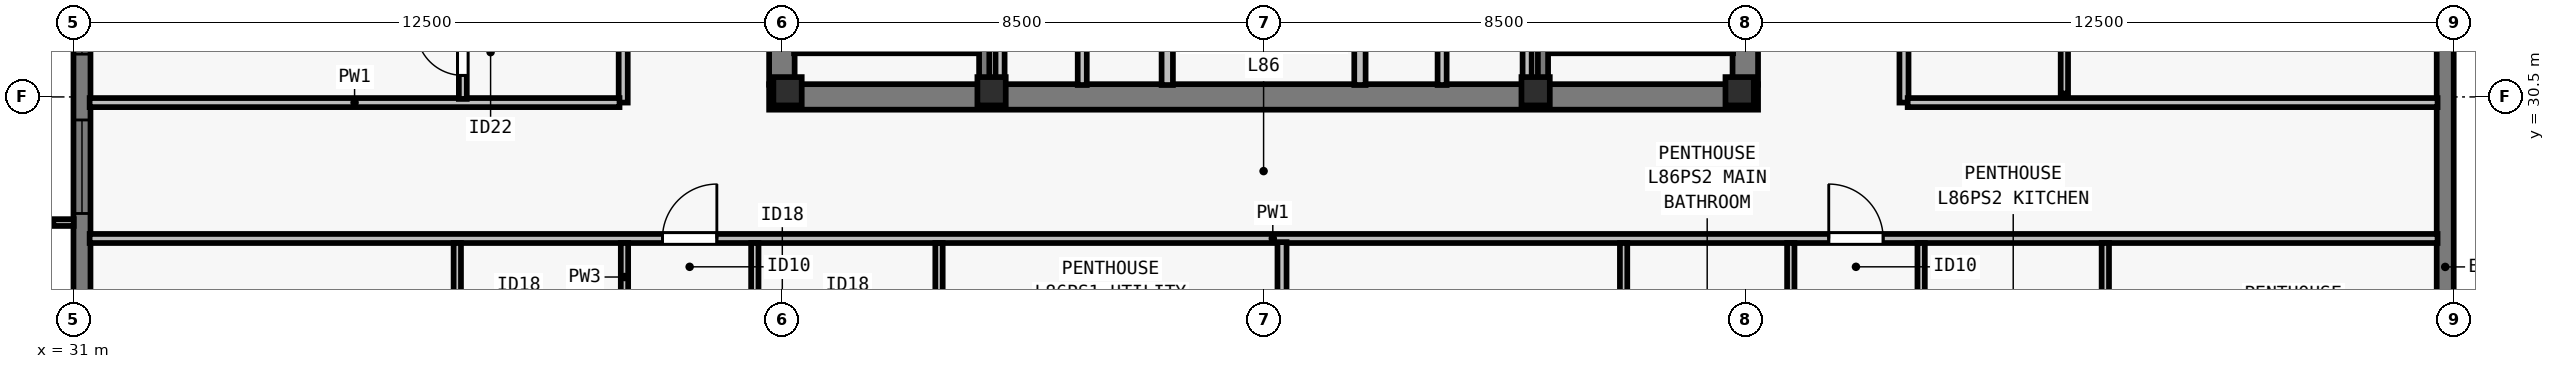
"""IFC4 building model, lengths in metres.
Left out: names, types, materials, properties, quantities, classifications, styles, units other than length and angle.
Written with IfcOpenShell. Run it as: python <this file> out.ifc"""

import sys

from ifc_helpers import new_model, si_unit, direction, frame, frame_2d, origin, origin_2d, place, context, subcontext, project, spatial, rectangle, i_section, extrude, element, fill, save


model = new_model("IFC4")
c1 = context("Model", 3, precision=1e-05, world=origin(), true_north=direction((0.0, 1.0)))
c2 = subcontext(c1, "Body", "Model", "MODEL_VIEW")
j1 = project(units=[si_unit("LENGTHUNIT", "METRE"), si_unit("PLANEANGLEUNIT", "RADIAN")], contexts=[c1])
p1 = place(None, origin())
s1 = spatial("IfcSite", under=j1, at=p1, CompositionType="ELEMENT")
p2 = place(p1, origin())
s2 = spatial("IfcBuilding", under=s1, at=p2, CompositionType="ELEMENT")
p3 = place(p2, frame((0.0, 0.0, 312.0)))
s3 = spatial("IfcBuildingStorey", under=s2, at=p3, CompositionType="ELEMENT", Elevation=312.0)
for number, where, z_axis, x_axis in (
    (1, (43.6, 30.6, 0.0), (0.0, 0.0, 1.0), (1.0, 0.0, 0.0)),
    (2, (47.2, 30.6, 0.0), (0.0, 0.0, 1.0), (1.0, 0.0, 0.0)),
    (3, (56.8, 30.6, 0.0), (0.0, 0.0, 1.0), (1.0, 0.0, 0.0)),
    (4, (60.4, 30.6, 0.0), (0.0, 0.0, 1.0), (1.0, 0.0, 0.0)),
):
    element("IfcColumn", number, at=place(p3, frame(where, z_axis=z_axis, x_axis=x_axis)), inside=s3, PredefinedType="COLUMN", context=c2, shape_type="SweptSolid", body=[
        extrude(i_section(OverallWidth=0.5, OverallDepth=0.5, WebThickness=0.028, FlangeThickness=0.045, at=origin_2d()), origin(), (0.0, 0.0, 1.0), 3.5),
    ])
p4 = place(p3, frame((72.85, 44.4, 0.0), z_axis=(0.0, 0.0, 1.0), x_axis=(0.0, -1.0, 0.0)))
e5 = element("IfcWall", 5, at=p4, inside=s3, PredefinedType="SOLIDWALL", context=c2, shape_type="SweptSolid", body=[
    extrude(rectangle(XDim=20.622, YDim=0.3, at=frame_2d((10.311, 0.0))), origin(), (0.0, 0.0, 1.0), 3.29),
])
p5 = place(p4, frame((2.815, 0.0, 0.8)))
e6 = element("IfcOpeningElement", 6, at=p5, cuts=e5, PredefinedType="OPENING", context=c2, shape_type="SweptSolid", body=[
    extrude(rectangle(XDim=1.65, YDim=1.758, at=frame_2d((0.825, 0.879))), frame((0.0, 0.16, 0.0), z_axis=(0.0, -1.0, 0.0), x_axis=(1.0, 0.0, 0.0)), (0.0, 0.0, 1.0), 0.32),
])
p6 = place(p4, frame((6.071, 0.0, 0.8)))
e7 = element("IfcOpeningElement", 7, at=p6, cuts=e5, PredefinedType="OPENING", context=c2, shape_type="SweptSolid", body=[
    extrude(rectangle(XDim=2.0, YDim=1.758, at=frame_2d((1.0, 0.879))), frame((0.0, 0.16, 0.0), z_axis=(0.0, -1.0, 0.0), x_axis=(1.0, 0.0, 0.0)), (0.0, 0.0, 1.0), 0.32),
])
p7 = place(p4, frame((11.376, 0.0, 0.8)))
e8 = element("IfcOpeningElement", 8, at=p7, cuts=e5, PredefinedType="OPENING", context=c2, shape_type="SweptSolid", body=[
    extrude(rectangle(XDim=1.65, YDim=1.758, at=frame_2d((0.825, 0.879))), frame((0.0, 0.16, 0.0), z_axis=(0.0, -1.0, 0.0), x_axis=(1.0, 0.0, 0.0)), (0.0, 0.0, 1.0), 0.32),
])
p8 = place(p3, frame((31.15, 23.5, 0.0), z_axis=(0.0, 0.0, 1.0), x_axis=(0.0, 1.0, 0.0)))
e9 = element("IfcWall", 9, at=p8, inside=s3, PredefinedType="SOLIDWALL", context=c2, shape_type="SweptSolid", body=[
    extrude(rectangle(XDim=30.722, YDim=0.3, at=frame_2d((15.361, 0.0))), origin(), (0.0, 0.0, 1.0), 3.29),
])
p9 = place(p8, frame((4.944, 0.0, 0.8)))
e10 = element("IfcOpeningElement", 10, at=p9, cuts=e9, PredefinedType="OPENING", context=c2, shape_type="SweptSolid", body=[
    extrude(rectangle(XDim=1.65, YDim=1.758, at=frame_2d((0.825, 0.879))), frame((0.0, 0.16, 0.0), z_axis=(0.0, -1.0, 0.0), x_axis=(1.0, 0.0, 0.0)), (0.0, 0.0, 1.0), 0.32),
])
p10 = place(p8, frame((7.756, 0.0, 0.8)))
e11 = element("IfcOpeningElement", 11, at=p10, cuts=e9, PredefinedType="OPENING", context=c2, shape_type="SweptSolid", body=[
    extrude(rectangle(XDim=2.0, YDim=1.758, at=frame_2d((1.0, 0.879))), frame((0.0, 0.16, 0.0), z_axis=(0.0, -1.0, 0.0), x_axis=(1.0, 0.0, 0.0)), (0.0, 0.0, 1.0), 0.32),
])
p11 = place(p8, frame((12.617, 0.0, 0.8)))
e12 = element("IfcOpeningElement", 12, at=p11, cuts=e9, PredefinedType="OPENING", context=c2, shape_type="SweptSolid", body=[
    extrude(rectangle(XDim=1.65, YDim=1.758, at=frame_2d((0.825, 0.879))), frame((0.0, 0.16, 0.0), z_axis=(0.0, -1.0, 0.0), x_axis=(1.0, 0.0, 0.0)), (0.0, 0.0, 1.0), 0.32),
])
p12 = place(p8, frame((17.53, 0.0, 0.8)))
e13 = element("IfcOpeningElement", 13, at=p12, cuts=e9, PredefinedType="OPENING", context=c2, shape_type="SweptSolid", body=[
    extrude(rectangle(XDim=2.0, YDim=1.758, at=frame_2d((1.0, 0.879))), frame((0.0, 0.16, 0.0), z_axis=(0.0, -1.0, 0.0), x_axis=(1.0, 0.0, 0.0)), (0.0, 0.0, 1.0), 0.32),
])
p13 = place(p8, frame((21.142, 0.0, 0.8)))
e14 = element("IfcOpeningElement", 14, at=p13, cuts=e9, PredefinedType="OPENING", context=c2, shape_type="SweptSolid", body=[
    extrude(rectangle(XDim=1.65, YDim=1.758, at=frame_2d((0.825, 0.879))), frame((0.0, 0.16, 0.0), z_axis=(0.0, -1.0, 0.0), x_axis=(1.0, 0.0, 0.0)), (0.0, 0.0, 1.0), 0.32),
])
p14 = place(p8, frame((26.87, 0.0, 0.8)))
e15 = element("IfcOpeningElement", 15, at=p14, cuts=e9, PredefinedType="OPENING", context=c2, shape_type="SweptSolid", body=[
    extrude(rectangle(XDim=0.9, YDim=1.75, at=frame_2d((0.45, 0.875))), frame((0.0, 0.16, 0.0), z_axis=(0.0, -1.0, 0.0), x_axis=(1.0, 0.0, 0.0)), (0.0, 0.0, 1.0), 0.32),
])
p15 = place(p3, frame((43.275, 30.5, 0.0), z_axis=(0.0, 0.0, 1.0), x_axis=(1.0, 0.0, 0.0)))
e16 = element("IfcWall", 16, at=p15, inside=s3, PredefinedType="SHEAR", context=c2, shape_type="SweptSolid", body=[
    extrude(rectangle(XDim=17.45, YDim=0.45, at=frame_2d((8.725, 0.0))), origin(), (0.0, 0.0, 1.0), 3.29),
])
for number, where, z_axis, x_axis in (
    (17, (43.5, 30.715, 0.0), (0.0, 0.0, 1.0), (0.0, 1.0, 0.0)),
    (18, (60.5, 30.715, 0.0), (0.0, 0.0, 1.0), (0.0, 1.0, 0.0)),
):
    element("IfcWall", number, at=place(p3, frame(where, z_axis=z_axis, x_axis=x_axis)), inside=s3, PredefinedType="SHEAR", context=c2, shape_type="SweptSolid", body=[
        extrude(rectangle(XDim=8.035, YDim=0.45, at=frame_2d((4.018, 0.0))), origin(), (0.0, 0.0, 1.0), 3.29),
    ])
p16 = place(p3, frame((50.3, 30.71, 0.0), z_axis=(0.0, 0.0, 1.0), x_axis=(0.0, 1.0, 0.0)))
e19 = element("IfcWall", 19, at=p16, inside=s3, PredefinedType="SOLIDWALL", context=c2, shape_type="SweptSolid", body=[
    extrude(rectangle(XDim=7.905, YDim=0.2, at=frame_2d((3.953, 0.0))), origin(), (0.0, 0.0, 1.0), 3.29),
])
p17 = place(p16, frame((2.14, 0.0, 0.0)))
e20 = element("IfcOpeningElement", 20, at=p17, cuts=e19, PredefinedType="OPENING", context=c2, shape_type="SweptSolid", body=[
    extrude(rectangle(XDim=0.95, YDim=2.12, at=frame_2d((0.475, 1.06))), frame((0.0, 0.11, 0.0), z_axis=(0.0, -1.0, 0.0), x_axis=(1.0, 0.0, 0.0)), (0.0, 0.0, 1.0), 0.22),
])
p18 = place(p3, frame((53.7, 30.71, 0.0), z_axis=(0.0, 0.0, 1.0), x_axis=(0.0, 1.0, 0.0)))
e21 = element("IfcWall", 21, at=p18, inside=s3, PredefinedType="SOLIDWALL", context=c2, shape_type="SweptSolid", body=[
    extrude(rectangle(XDim=7.905, YDim=0.2, at=frame_2d((3.953, 0.0))), origin(), (0.0, 0.0, 1.0), 3.29),
])
p19 = place(p18, frame((2.14, 0.0, 0.0)))
e22 = element("IfcOpeningElement", 22, at=p19, cuts=e21, PredefinedType="OPENING", context=c2, shape_type="SweptSolid", body=[
    extrude(rectangle(XDim=0.95, YDim=2.12, at=frame_2d((0.475, 1.06))), frame((0.0, 0.11, 0.0), z_axis=(0.0, -1.0, 0.0), x_axis=(1.0, 0.0, 0.0)), (0.0, 0.0, 1.0), 0.22),
])
p20 = place(p3, frame((47.35, 30.71, 0.0), z_axis=(0.0, 0.0, 1.0), x_axis=(0.0, 1.0, 0.0)))
e23 = element("IfcWall", 23, at=p20, inside=s3, PredefinedType="PARTITIONING", context=c2, shape_type="SweptSolid", body=[
    extrude(rectangle(XDim=7.905, YDim=0.16, at=frame_2d((3.953, 0.0))), origin(), (0.0, 0.0, 1.0), 3.29),
])
p21 = place(p3, frame((48.8, 30.71, 0.0), z_axis=(0.0, 0.0, 1.0), x_axis=(0.0, 1.0, 0.0)))
e24 = element("IfcWall", 24, at=p21, inside=s3, PredefinedType="PARTITIONING", context=c2, shape_type="SweptSolid", body=[
    extrude(rectangle(XDim=7.905, YDim=0.16, at=frame_2d((3.953, 0.0))), origin(), (0.0, 0.0, 1.0), 3.29),
])
p22 = place(p21, frame((3.54, 0.0, 0.0)))
e25 = element("IfcOpeningElement", 25, at=p22, cuts=e24, PredefinedType="OPENING", context=c2, shape_type="SweptSolid", body=[
    extrude(rectangle(XDim=0.85, YDim=2.12, at=frame_2d((0.425, 1.06))), frame((0.0, 0.09, 0.0), z_axis=(0.0, -1.0, 0.0), x_axis=(1.0, 0.0, 0.0)), (0.0, 0.0, 1.0), 0.18),
])
p23 = place(p3, frame((56.65, 30.71, 0.0), z_axis=(0.0, 0.0, 1.0), x_axis=(0.0, 1.0, 0.0)))
e26 = element("IfcWall", 26, at=p23, inside=s3, PredefinedType="PARTITIONING", context=c2, shape_type="SweptSolid", body=[
    extrude(rectangle(XDim=7.905, YDim=0.16, at=frame_2d((3.953, 0.0))), origin(), (0.0, 0.0, 1.0), 3.29),
])
p24 = place(p3, frame((55.15, 30.71, 0.0), z_axis=(0.0, 0.0, 1.0), x_axis=(0.0, 1.0, 0.0)))
e27 = element("IfcWall", 27, at=p24, inside=s3, PredefinedType="PARTITIONING", context=c2, shape_type="SweptSolid", body=[
    extrude(rectangle(XDim=7.905, YDim=0.16, at=frame_2d((3.953, 0.0))), origin(), (0.0, 0.0, 1.0), 3.29),
])
p25 = place(p24, frame((3.54, 0.0, 0.0)))
e28 = element("IfcOpeningElement", 28, at=p25, cuts=e27, PredefinedType="OPENING", context=c2, shape_type="SweptSolid", body=[
    extrude(rectangle(XDim=0.85, YDim=2.12, at=frame_2d((0.425, 1.06))), frame((0.0, 0.09, 0.0), z_axis=(0.0, -1.0, 0.0), x_axis=(1.0, 0.0, 0.0)), (0.0, 0.0, 1.0), 0.18),
])
p26 = place(p3, frame((31.285, 28.002, 0.0), z_axis=(0.0, 0.0, 1.0), x_axis=(1.0, 0.0, 0.0)))
e29 = element("IfcWall", 29, at=p26, inside=s3, PredefinedType="PARTITIONING", context=c2, shape_type="SweptSolid", body=[
    extrude(rectangle(XDim=41.43, YDim=0.16, at=frame_2d((20.715, 0.0))), origin(), (0.0, 0.0, 1.0), 3.009),
])
p27 = place(p26, frame((10.107, 0.0, 0.0)))
e30 = element("IfcOpeningElement", 30, at=p27, cuts=e29, PredefinedType="OPENING", context=c2, shape_type="SweptSolid", body=[
    extrude(rectangle(XDim=0.96, YDim=2.18, at=frame_2d((0.48, 1.09))), frame((0.0, 0.09, 0.0), z_axis=(0.0, -1.0, 0.0), x_axis=(1.0, 0.0, 0.0)), (0.0, 0.0, 1.0), 0.18),
])
p28 = place(p26, frame((30.688, 0.0, 0.0)))
e31 = element("IfcOpeningElement", 31, at=p28, cuts=e29, PredefinedType="OPENING", context=c2, shape_type="SweptSolid", body=[
    extrude(rectangle(XDim=0.96, YDim=2.18, at=frame_2d((0.48, 1.09))), frame((0.0, 0.09, 0.0), z_axis=(0.0, -1.0, 0.0), x_axis=(1.0, 0.0, 0.0)), (0.0, 0.0, 1.0), 0.18),
])
p29 = place(p3, frame((40.7, 30.4, 0.0), z_axis=(0.0, 0.0, 1.0), x_axis=(0.0, 1.0, 0.0)))
e32 = element("IfcWall", 32, at=p29, inside=s3, PredefinedType="PARTITIONING", context=c2, shape_type="SweptSolid", body=[
    extrude(rectangle(XDim=17.2, YDim=0.16, at=frame_2d((8.6, 0.0))), origin(), (0.0, 0.0, 1.0), 3.009),
])
p30 = place(p29, frame((8.12, 0.0, 0.0)))
e33 = element("IfcOpeningElement", 33, at=p30, cuts=e32, PredefinedType="OPENING", context=c2, shape_type="SweptSolid", body=[
    extrude(rectangle(XDim=0.96, YDim=2.18, at=frame_2d((0.48, 1.09))), frame((0.0, 0.09, 0.0), z_axis=(0.0, -1.0, 0.0), x_axis=(1.0, 0.0, 0.0)), (0.0, 0.0, 1.0), 0.18),
])
p31 = place(p3, frame((63.3, 30.4, 0.0), z_axis=(0.0, 0.0, 1.0), x_axis=(0.0, 1.0, 0.0)))
e34 = element("IfcWall", 34, at=p31, inside=s3, PredefinedType="PARTITIONING", context=c2, shape_type="SweptSolid", body=[
    extrude(rectangle(XDim=17.2, YDim=0.16, at=frame_2d((8.6, 0.0))), origin(), (0.0, 0.0, 1.0), 3.29),
])
p32 = place(p31, frame((3.82, 0.0, 0.0)))
e35 = element("IfcOpeningElement", 35, at=p32, cuts=e34, PredefinedType="OPENING", context=c2, shape_type="SweptSolid", body=[
    extrude(rectangle(XDim=0.96, YDim=2.18, at=frame_2d((0.48, 1.09))), frame((0.0, 0.09, 0.0), z_axis=(0.0, -1.0, 0.0), x_axis=(1.0, 0.0, 0.0)), (0.0, 0.0, 1.0), 0.18),
])
p33 = place(p31, frame((12.42, 0.0, 0.0)))
e36 = element("IfcOpeningElement", 36, at=p33, cuts=e34, PredefinedType="OPENING", context=c2, shape_type="SweptSolid", body=[
    extrude(rectangle(XDim=0.96, YDim=2.18, at=frame_2d((0.48, 1.09))), frame((0.0, 0.09, 0.0), z_axis=(0.0, -1.0, 0.0), x_axis=(1.0, 0.0, 0.0)), (0.0, 0.0, 1.0), 0.18),
])
for number, where, z_axis, x_axis in (
    (37, (31.285, 30.4, 0.0), (0.0, 0.0, 1.0), (1.0, 0.0, 0.0)),
    (38, (63.365, 30.4, 0.0), (0.0, 0.0, 1.0), (1.0, 0.0, 0.0)),
):
    element("IfcWall", number, at=place(p3, frame(where, z_axis=z_axis, x_axis=x_axis)), inside=s3, PredefinedType="PARTITIONING", context=c2, shape_type="SweptSolid", body=[
        extrude(rectangle(XDim=9.35, YDim=0.16, at=frame_2d((4.675, 0.0))), origin(), (0.0, 0.0, 1.0), 3.29),
    ])
p34 = place(p3, frame((37.772, 25.173, 0.0), z_axis=(0.0, 0.0, 1.0), x_axis=(0.0, 1.0, 0.0)))
e39 = element("IfcWall", 39, at=p34, inside=s3, PredefinedType="PLUMBINGWALL", context=c2, shape_type="SweptSolid", body=[
    extrude(rectangle(XDim=2.75, YDim=0.13, at=frame_2d((1.375, 0.0))), origin(), (0.0, 0.0, 1.0), 3.29),
])
p35 = place(p3, frame((40.722, 25.173, 0.0), z_axis=(0.0, 0.0, 1.0), x_axis=(0.0, 1.0, 0.0)))
e40 = element("IfcWall", 40, at=p35, inside=s3, PredefinedType="PLUMBINGWALL", context=c2, shape_type="SweptSolid", body=[
    extrude(rectangle(XDim=2.75, YDim=0.13, at=frame_2d((1.375, 0.0))), origin(), (0.0, 0.0, 1.0), 2.653),
])
p36 = place(p35, frame((0.55, 0.0, 0.0)))
e41 = element("IfcOpeningElement", 41, at=p36, cuts=e40, PredefinedType="OPENING", context=c2, shape_type="SweptSolid", body=[
    extrude(rectangle(XDim=0.85, YDim=2.08, at=frame_2d((0.425, 1.04))), frame((0.0, 0.075, 0.0), z_axis=(0.0, -1.0, 0.0), x_axis=(1.0, 0.0, 0.0)), (0.0, 0.0, 1.0), 0.15),
])
p37 = place(p3, frame((46.272, 25.173, 0.0), z_axis=(0.0, 0.0, 1.0), x_axis=(0.0, 1.0, 0.0)))
e42 = element("IfcWall", 42, at=p37, inside=s3, PredefinedType="PLUMBINGWALL", context=c2, shape_type="SweptSolid", body=[
    extrude(rectangle(XDim=2.75, YDim=0.13, at=frame_2d((1.375, 0.0))), origin(), (0.0, 0.0, 1.0), 3.29),
])
p38 = place(p3, frame((43.022, 25.173, 0.0), z_axis=(0.0, 0.0, 1.0), x_axis=(0.0, 1.0, 0.0)))
e43 = element("IfcWall", 43, at=p38, inside=s3, PredefinedType="PLUMBINGWALL", context=c2, shape_type="SweptSolid", body=[
    extrude(rectangle(XDim=2.75, YDim=0.13, at=frame_2d((1.375, 0.0))), origin(), (0.0, 0.0, 1.0), 3.29),
])
p39 = place(p38, frame((0.55, 0.0, 0.0)))
e44 = element("IfcOpeningElement", 44, at=p39, cuts=e43, PredefinedType="OPENING", context=c2, shape_type="SweptSolid", body=[
    extrude(rectangle(XDim=0.88, YDim=2.1, at=frame_2d((0.44, 1.05))), frame((0.0, 0.075, 0.0), z_axis=(0.0, -1.0, 0.0), x_axis=(1.0, 0.0, 0.0)), (0.0, 0.0, 1.0), 0.15),
])
p40 = place(p3, frame((52.325, 18.285, 0.0), z_axis=(0.0, 0.0, 1.0), x_axis=(0.0, 1.0, 0.0)))
e45 = element("IfcWall", 45, at=p40, inside=s3, PredefinedType="PARTITIONING", context=c2, shape_type="SweptSolid", body=[
    extrude(rectangle(XDim=9.653, YDim=0.16, at=frame_2d((4.826, 0.0))), origin(), (0.0, 0.0, 1.0), 3.009),
])
p41 = place(p3, frame((58.353, 25.173, 0.0), z_axis=(0.0, 0.0, 1.0), x_axis=(0.0, 1.0, 0.0)))
e46 = element("IfcWall", 46, at=p41, inside=s3, PredefinedType="PLUMBINGWALL", context=c2, shape_type="SweptSolid", body=[
    extrude(rectangle(XDim=2.75, YDim=0.13, at=frame_2d((1.375, 0.0))), origin(), (0.0, 0.0, 1.0), 3.29),
])
p42 = place(p3, frame((61.302, 25.173, 0.0), z_axis=(0.0, 0.0, 1.0), x_axis=(0.0, 1.0, 0.0)))
e47 = element("IfcWall", 47, at=p42, inside=s3, PredefinedType="PLUMBINGWALL", context=c2, shape_type="SweptSolid", body=[
    extrude(rectangle(XDim=2.75, YDim=0.13, at=frame_2d((1.375, 0.0))), origin(), (0.0, 0.0, 1.0), 3.29),
])
p43 = place(p42, frame((0.55, 0.0, 0.0)))
e48 = element("IfcOpeningElement", 48, at=p43, cuts=e47, PredefinedType="OPENING", context=c2, shape_type="SweptSolid", body=[
    extrude(rectangle(XDim=0.85, YDim=2.08, at=frame_2d((0.425, 1.04))), frame((0.0, 0.075, 0.0), z_axis=(0.0, -1.0, 0.0), x_axis=(1.0, 0.0, 0.0)), (0.0, 0.0, 1.0), 0.15),
])
p44 = place(p3, frame((66.853, 25.173, 0.0), z_axis=(0.0, 0.0, 1.0), x_axis=(0.0, 1.0, 0.0)))
e49 = element("IfcWall", 49, at=p44, inside=s3, PredefinedType="PLUMBINGWALL", context=c2, shape_type="SweptSolid", body=[
    extrude(rectangle(XDim=2.75, YDim=0.13, at=frame_2d((1.375, 0.0))), origin(), (0.0, 0.0, 1.0), 3.29),
])
p45 = place(p3, frame((63.603, 25.173, 0.0), z_axis=(0.0, 0.0, 1.0), x_axis=(0.0, 1.0, 0.0)))
e50 = element("IfcWall", 50, at=p45, inside=s3, PredefinedType="PLUMBINGWALL", context=c2, shape_type="SweptSolid", body=[
    extrude(rectangle(XDim=2.75, YDim=0.13, at=frame_2d((1.375, 0.0))), origin(), (0.0, 0.0, 1.0), 3.29),
])
p46 = place(p45, frame((0.55, 0.0, 0.0)))
e51 = element("IfcOpeningElement", 51, at=p46, cuts=e50, PredefinedType="OPENING", context=c2, shape_type="SweptSolid", body=[
    extrude(rectangle(XDim=0.88, YDim=2.1, at=frame_2d((0.44, 1.05))), frame((0.0, 0.075, 0.0), z_axis=(0.0, -1.0, 0.0), x_axis=(1.0, 0.0, 0.0)), (0.0, 0.0, 1.0), 0.15),
])
p47 = place(p3, frame((37.87, 30.465, 0.0), z_axis=(0.0, 0.0, 1.0), x_axis=(0.0, 1.0, 0.0)))
e52 = element("IfcWall", 52, at=p47, inside=s3, PredefinedType="PARTITIONING", context=c2, shape_type="SweptSolid", body=[
    extrude(rectangle(XDim=4.16, YDim=0.14, at=frame_2d((2.08, 0.0))), origin(), (0.0, 0.0, 1.0), 3.29),
])
p48 = place(p47, frame((0.415, 0.0, 0.0)))
e53 = element("IfcOpeningElement", 53, at=p48, cuts=e52, PredefinedType="OPENING", context=c2, shape_type="SweptSolid", body=[
    extrude(rectangle(XDim=0.82, YDim=2.1, at=frame_2d((0.41, 1.05))), frame((0.0, 0.08, 0.0), z_axis=(0.0, -1.0, 0.0), x_axis=(1.0, 0.0, 0.0)), (0.0, 0.0, 1.0), 0.16),
])
p49 = place(p3, frame((66.13, 30.56, 0.0), z_axis=(0.0, 0.0, 1.0), x_axis=(0.0, 1.0, 0.0)))
e54 = element("IfcWall", 54, at=p49, inside=s3, PredefinedType="PLUMBINGWALL", context=c2, shape_type="SweptSolid", body=[
    extrude(rectangle(XDim=2.94, YDim=0.13, at=frame_2d((1.47, 0.0))), origin(), (0.0, 0.0, 1.0), 3.29),
])
p50 = place(p3, frame((43.715, 31.36, 0.0), z_axis=(0.0, 0.0, 1.0), x_axis=(1.0, 0.0, 0.0)))
e55 = element("IfcWall", 55, at=p50, inside=s3, PredefinedType="SOLIDWALL", context=c2, shape_type="SweptSolid", body=[
    extrude(rectangle(XDim=3.28, YDim=0.18, at=frame_2d((1.64, 0.0))), origin(), (0.0, 0.0, 1.0), 3.29),
])
p51 = place(p3, frame((47.07, 38.78, 0.0), z_axis=(0.0, 0.0, 1.0), x_axis=(0.0, -1.0, 0.0)))
e56 = element("IfcWall", 56, at=p51, inside=s3, PredefinedType="SOLIDWALL", context=c2, shape_type="SweptSolid", body=[
    extrude(rectangle(XDim=8.067, YDim=0.18, at=frame_2d((4.034, 0.0))), origin(), (0.0, 0.0, 1.0), 3.29),
])
p52 = place(p3, frame((57.005, 31.36, 0.0), z_axis=(0.0, 0.0, 1.0), x_axis=(1.0, 0.0, 0.0)))
e57 = element("IfcWall", 57, at=p52, inside=s3, PredefinedType="SOLIDWALL", context=c2, shape_type="SweptSolid", body=[
    extrude(rectangle(XDim=3.28, YDim=0.18, at=frame_2d((1.64, 0.0))), origin(), (0.0, 0.0, 1.0), 3.29),
])
p53 = place(p3, frame((56.93, 38.78, 0.0), z_axis=(0.0, 0.0, 1.0), x_axis=(0.0, -1.0, 0.0)))
e58 = element("IfcWall", 58, at=p53, inside=s3, PredefinedType="SOLIDWALL", context=c2, shape_type="SweptSolid", body=[
    extrude(rectangle(XDim=8.067, YDim=0.18, at=frame_2d((4.034, 0.0))), origin(), (0.0, 0.0, 1.0), 3.29),
])
p54 = place(p9, origin())
e59 = element("IfcWindow", 59, at=p54, inside=s3, PartitioningType="SINGLE_PANEL", PredefinedType="WINDOW", context=c2, shape_type="SweptSolid", body=[
    extrude(rectangle(XDim=1.65, YDim=1.758, at=frame_2d((0.825, 0.879))), frame((0.0, -0.05, 0.0), z_axis=(0.0, -1.0, 0.0), x_axis=(1.0, 0.0, 0.0)), (0.0, 0.0, 1.0), 0.06),
])
fill(e10, e59)
p55 = place(p10, origin())
e60 = element("IfcWindow", 60, at=p55, inside=s3, PartitioningType="SINGLE_PANEL", PredefinedType="WINDOW", context=c2, shape_type="SweptSolid", body=[
    extrude(rectangle(XDim=2.0, YDim=1.758, at=frame_2d((1.0, 0.879))), frame((0.0, -0.05, 0.0), z_axis=(0.0, -1.0, 0.0), x_axis=(1.0, 0.0, 0.0)), (0.0, 0.0, 1.0), 0.06),
])
fill(e11, e60)
p56 = place(p27, origin())
e61 = element("IfcDoor", 61, at=p56, inside=s3, OperationType="SINGLE_SWING_RIGHT", PredefinedType="DOOR", context=c2, shape_type="SweptSolid", body=[
    extrude(rectangle(XDim=0.96, YDim=2.18, at=frame_2d((0.48, 1.09))), frame((0.0, 0.025, 0.0), z_axis=(0.0, -1.0, 0.0), x_axis=(1.0, 0.0, 0.0)), (0.0, 0.0, 1.0), 0.05),
])
fill(e30, e61)
p57 = place(p28, origin())
e62 = element("IfcDoor", 62, at=p57, inside=s3, OperationType="SINGLE_SWING_LEFT", PredefinedType="DOOR", context=c2, shape_type="SweptSolid", body=[
    extrude(rectangle(XDim=0.96, YDim=2.18, at=frame_2d((0.48, 1.09))), frame((0.0, 0.025, 0.0), z_axis=(0.0, -1.0, 0.0), x_axis=(1.0, 0.0, 0.0)), (0.0, 0.0, 1.0), 0.05),
])
fill(e31, e62)
p58 = place(p48, origin())
e63 = element("IfcDoor", 63, at=p58, inside=s3, OperationType="SINGLE_SWING_RIGHT", PredefinedType="DOOR", context=c2, shape_type="SweptSolid", body=[
    extrude(rectangle(XDim=0.82, YDim=2.1, at=frame_2d((0.41, 1.05))), frame((0.0, 0.025, 0.0), z_axis=(0.0, -1.0, 0.0), x_axis=(1.0, 0.0, 0.0)), (0.0, 0.0, 1.0), 0.05),
])
fill(e53, e63)
save(model, sys.argv[1])
